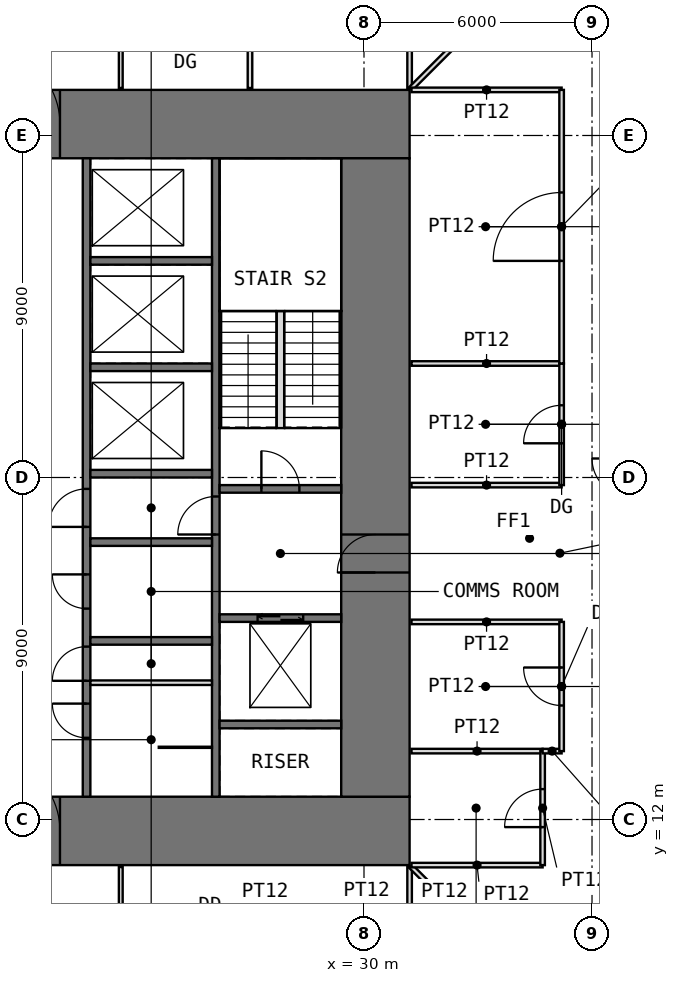
"""IFC4 building model, lengths in metres.
Left out: names, types, materials, properties, quantities, classifications, styles, units other than length and angle.
Written with IfcOpenShell. Run it as: python <this file> out.ifc"""

import sys

from ifc_helpers import new_model, si_unit, direction, frame, frame_2d, origin, place, context, subcontext, project, spatial, rectangle, extrude, element, fill, save


model = new_model("IFC4")
c1 = context("Model", 3, precision=1e-05, world=origin(), true_north=direction((0.0, 1.0)))
c2 = subcontext(c1, "Body", "Model", "MODEL_VIEW")
j1 = project(units=[si_unit("LENGTHUNIT", "METRE"), si_unit("PLANEANGLEUNIT", "RADIAN")], contexts=[c1])
p1 = place(None, origin())
s1 = spatial("IfcSite", under=j1, at=p1, CompositionType="ELEMENT")
p2 = place(p1, origin())
s2 = spatial("IfcBuilding", under=s1, at=p2, CompositionType="ELEMENT")
p3 = place(p2, frame((0.0, 0.0, 22.5)))
s3 = spatial("IfcBuildingStorey", under=s2, at=p3, CompositionType="ELEMENT", Elevation=22.5)
p4 = place(p3, frame((10.8, 11.7, -0.05), z_axis=(0.0, 0.0, 1.0), x_axis=(1.0, 0.0, 0.0)))
e1 = element("IfcWall", 1, at=p4, inside=s3, PredefinedType="SHEAR", context=c2, shape_type="SweptSolid", body=[
    extrude(rectangle(XDim=20.4, YDim=1.8, at=frame_2d((10.2, 0.0))), origin(), (0.0, 0.0, 1.0), 4.0),
])
p5 = place(p4, frame((9.2, 0.0, 0.05)))
e2 = element("IfcOpeningElement", 2, at=p5, cuts=e1, PredefinedType="OPENING", context=c2, shape_type="SweptSolid", body=[
    extrude(rectangle(XDim=2.0, YDim=2.2, at=frame_2d((1.0, 1.1))), frame((0.0, 0.91, 0.0), z_axis=(0.0, -1.0, 0.0), x_axis=(1.0, 0.0, 0.0)), (0.0, 0.0, 1.0), 1.82),
])
p6 = place(p3, frame((10.8, 30.3, -0.05), z_axis=(0.0, 0.0, 1.0), x_axis=(1.0, 0.0, 0.0)))
e3 = element("IfcWall", 3, at=p6, inside=s3, PredefinedType="SHEAR", context=c2, shape_type="SweptSolid", body=[
    extrude(rectangle(XDim=20.4, YDim=1.8, at=frame_2d((10.2, 0.0))), origin(), (0.0, 0.0, 1.0), 4.0),
])
p7 = place(p6, frame((9.2, 0.0, 0.05)))
e4 = element("IfcOpeningElement", 4, at=p7, cuts=e3, PredefinedType="OPENING", context=c2, shape_type="SweptSolid", body=[
    extrude(rectangle(XDim=2.0, YDim=2.2, at=frame_2d((1.0, 1.1))), frame((0.0, 0.91, 0.0), z_axis=(0.0, -1.0, 0.0), x_axis=(1.0, 0.0, 0.0)), (0.0, 0.0, 1.0), 1.82),
])
p8 = place(p3, frame((30.3, 12.6, -0.05), z_axis=(0.0, 0.0, 1.0), x_axis=(0.0, 1.0, 0.0)))
e5 = element("IfcWall", 5, at=p8, inside=s3, PredefinedType="SHEAR", context=c2, shape_type="SweptSolid", body=[
    extrude(rectangle(XDim=16.8, YDim=1.8, at=frame_2d((8.4, 0.0))), origin(), (0.0, 0.0, 1.0), 4.0),
])
p9 = place(p8, frame((5.9, 0.0, 0.05)))
e6 = element("IfcOpeningElement", 6, at=p9, cuts=e5, PredefinedType="OPENING", context=c2, shape_type="SweptSolid", body=[
    extrude(rectangle(XDim=1.0, YDim=2.2, at=frame_2d((0.5, 1.1))), frame((0.0, 0.91, 0.0), z_axis=(0.0, -1.0, 0.0), x_axis=(1.0, 0.0, 0.0)), (0.0, 0.0, 1.0), 1.82),
])
p10 = place(p3, frame((22.7, 12.6, -0.05), z_axis=(0.0, 0.0, 1.0), x_axis=(0.0, 1.0, 0.0)))
e7 = element("IfcWall", 7, at=p10, inside=s3, PredefinedType="SHEAR", context=c2, shape_type="SweptSolid", body=[
    extrude(rectangle(XDim=16.8, YDim=0.2, at=frame_2d((8.4, 0.0))), origin(), (0.0, 0.0, 1.0), 4.0),
])
p11 = place(p10, frame((3.05, 0.0, 0.05)))
e8 = element("IfcOpeningElement", 8, at=p11, cuts=e7, PredefinedType="OPENING", context=c2, shape_type="SweptSolid", body=[
    extrude(rectangle(XDim=0.9, YDim=2.2, at=frame_2d((0.45, 1.1))), frame((0.0, 0.11, 0.0), z_axis=(0.0, -1.0, 0.0), x_axis=(1.0, 0.0, 0.0)), (0.0, 0.0, 1.0), 0.22),
])
p12 = place(p10, frame((7.1, 0.0, 0.05)))
e9 = element("IfcOpeningElement", 9, at=p12, cuts=e7, PredefinedType="OPENING", context=c2, shape_type="SweptSolid", body=[
    extrude(rectangle(XDim=1.0, YDim=2.2, at=frame_2d((0.5, 1.1))), frame((0.0, 0.11, 0.0), z_axis=(0.0, -1.0, 0.0), x_axis=(1.0, 0.0, 0.0)), (0.0, 0.0, 1.0), 0.22),
])
p13 = place(p10, frame((1.55, 0.0, 0.05)))
e10 = element("IfcOpeningElement", 10, at=p13, cuts=e7, PredefinedType="OPENING", context=c2, shape_type="SweptSolid", body=[
    extrude(rectangle(XDim=0.9, YDim=2.2, at=frame_2d((0.45, 1.1))), frame((0.0, 0.11, 0.0), z_axis=(0.0, -1.0, 0.0), x_axis=(1.0, 0.0, 0.0)), (0.0, 0.0, 1.0), 0.22),
])
p14 = place(p10, frame((4.95, 0.0, 0.05)))
e11 = element("IfcOpeningElement", 11, at=p14, cuts=e7, PredefinedType="OPENING", context=c2, shape_type="SweptSolid", body=[
    extrude(rectangle(XDim=0.9, YDim=2.2, at=frame_2d((0.45, 1.1))), frame((0.0, 0.11, 0.0), z_axis=(0.0, -1.0, 0.0), x_axis=(1.0, 0.0, 0.0)), (0.0, 0.0, 1.0), 0.22),
])
p15 = place(p3, frame((26.1, 12.6, -0.05), z_axis=(0.0, 0.0, 1.0), x_axis=(0.0, 1.0, 0.0)))
e12 = element("IfcWall", 12, at=p15, inside=s3, PredefinedType="SHEAR", context=c2, shape_type="SweptSolid", body=[
    extrude(rectangle(XDim=16.8, YDim=0.2, at=frame_2d((8.4, 0.0))), origin(), (0.0, 0.0, 1.0), 4.0),
])
p16 = place(p15, frame((6.9, 0.0, 0.05)))
e13 = element("IfcOpeningElement", 13, at=p16, cuts=e12, PredefinedType="OPENING", context=c2, shape_type="SweptSolid", body=[
    extrude(rectangle(XDim=1.0, YDim=2.2, at=frame_2d((0.5, 1.1))), frame((0.0, 0.11, 0.0), z_axis=(0.0, -1.0, 0.0), x_axis=(1.0, 0.0, 0.0)), (0.0, 0.0, 1.0), 0.22),
])
for number, where, z_axis, x_axis in (
    (14, (22.8, 16.7, -0.05), (0.0, 0.0, 1.0), (1.0, 0.0, 0.0)),
    (15, (22.8, 19.3, -0.05), (0.0, 0.0, 1.0), (1.0, 0.0, 0.0)),
    (16, (22.8, 21.1, -0.05), (0.0, 0.0, 1.0), (1.0, 0.0, 0.0)),
    (17, (22.8, 23.9, -0.05), (0.0, 0.0, 1.0), (1.0, 0.0, 0.0)),
    (18, (22.8, 26.7, -0.05), (0.0, 0.0, 1.0), (1.0, 0.0, 0.0)),
    (19, (26.2, 14.5, -0.05), (0.0, 0.0, 1.0), (1.0, 0.0, 0.0)),
):
    element("IfcWall", number, at=place(p3, frame(where, z_axis=z_axis, x_axis=x_axis)), inside=s3, PredefinedType="SHEAR", context=c2, shape_type="SweptSolid", body=[
        extrude(rectangle(XDim=3.2, YDim=0.2, at=frame_2d((1.6, 0.0))), origin(), (0.0, 0.0, 1.0), 4.0),
    ])
p17 = place(p3, frame((26.2, 17.3, -0.05), z_axis=(0.0, 0.0, 1.0), x_axis=(1.0, 0.0, 0.0)))
e20 = element("IfcWall", 20, at=p17, inside=s3, PredefinedType="SHEAR", context=c2, shape_type="SweptSolid", body=[
    extrude(rectangle(XDim=3.2, YDim=0.2, at=frame_2d((1.6, 0.0))), origin(), (0.0, 0.0, 1.0), 4.0),
])
p18 = place(p17, frame((1.0, 0.0, 0.05)))
e21 = element("IfcOpeningElement", 21, at=p18, cuts=e20, PredefinedType="OPENING", context=c2, shape_type="SweptSolid", body=[
    extrude(rectangle(XDim=1.2, YDim=2.2, at=frame_2d((0.6, 1.1))), frame((0.0, 0.11, 0.0), z_axis=(0.0, -1.0, 0.0), x_axis=(1.0, 0.0, 0.0)), (0.0, 0.0, 1.0), 0.22),
])
p19 = place(p3, frame((26.2, 20.7, -0.05), z_axis=(0.0, 0.0, 1.0), x_axis=(1.0, 0.0, 0.0)))
e22 = element("IfcWall", 22, at=p19, inside=s3, PredefinedType="SHEAR", context=c2, shape_type="SweptSolid", body=[
    extrude(rectangle(XDim=3.2, YDim=0.2, at=frame_2d((1.6, 0.0))), origin(), (0.0, 0.0, 1.0), 4.0),
])
p20 = place(p19, frame((1.1, 0.0, 0.05)))
e23 = element("IfcOpeningElement", 23, at=p20, cuts=e22, PredefinedType="OPENING", context=c2, shape_type="SweptSolid", body=[
    extrude(rectangle(XDim=1.0, YDim=2.2, at=frame_2d((0.5, 1.1))), frame((0.0, 0.11, 0.0), z_axis=(0.0, -1.0, 0.0), x_axis=(1.0, 0.0, 0.0)), (0.0, 0.0, 1.0), 0.22),
])
p21 = place(p3, frame((22.8, 15.6, 0.0), z_axis=(0.0, 0.0, 1.0), x_axis=(1.0, 0.0, 0.0)))
e24 = element("IfcWall", 24, at=p21, inside=s3, PredefinedType="PARTITIONING", context=c2, shape_type="SweptSolid", body=[
    extrude(rectangle(XDim=3.2, YDim=0.12, at=frame_2d((1.6, 0.0))), origin(), (0.0, 0.0, 1.0), 3.75),
])
p22 = place(p3, frame((24.6, 13.9, 0.0), z_axis=(0.0, 0.0, 1.0), x_axis=(1.0, 0.0, 0.0)))
e25 = element("IfcWall", 25, at=p22, inside=s3, PredefinedType="PARTITIONING", context=c2, shape_type="SweptSolid", body=[
    extrude(rectangle(XDim=1.4, YDim=0.03, at=frame_2d((0.7, 0.0))), origin(), (0.0, 0.0, 1.0), 3.75),
])
for number, where, z_axis, x_axis in (
    (26, (23.6, 7.2, 0.0), (0.0, 0.0, 1.0), (0.0, 1.0, 0.0)),
    (27, (23.6, 31.25, 0.0), (0.0, 0.0, 1.0), (0.0, 1.0, 0.0)),
):
    element("IfcWall", number, at=place(p3, frame(where, z_axis=z_axis, x_axis=x_axis)), inside=s3, PredefinedType="PARTITIONING", context=c2, shape_type="SweptSolid", body=[
        extrude(rectangle(XDim=3.55, YDim=0.1, at=frame_2d((1.775, 0.0))), origin(), (0.0, 0.0, 1.0), 3.75),
    ])
for number, where, z_axis, x_axis in (
    (28, (27.0, 31.25, 0.0), (0.0, 0.0, 1.0), (0.0, 1.0, 0.0)),
    (29, (31.2, 7.2, 0.0), (0.0, 0.0, 1.0), (0.0, 1.0, 0.0)),
    (30, (31.2, 31.25, 0.0), (0.0, 0.0, 1.0), (0.0, 1.0, 0.0)),
):
    element("IfcWall", number, at=place(p3, frame(where, z_axis=z_axis, x_axis=x_axis)), inside=s3, PredefinedType="PARTITIONING", context=c2, shape_type="SweptSolid", body=[
        extrude(rectangle(XDim=3.55, YDim=0.12, at=frame_2d((1.775, 0.0))), origin(), (0.0, 0.0, 1.0), 3.75),
    ])
p23 = place(p3, frame((31.235, 10.765, 0.0), z_axis=(0.0, 0.0, 1.0), x_axis=(0.707106781187, -0.707106781187, 0.0)))
e31 = element("IfcWall", 31, at=p23, inside=s3, PredefinedType="PARTITIONING", context=c2, shape_type="SweptSolid", body=[
    extrude(rectangle(XDim=3.346, YDim=0.12, at=frame_2d((1.673, 0.0))), origin(), (0.0, 0.0, 1.0), 3.75),
])
p24 = place(p3, frame((31.235, 31.235, 0.0), z_axis=(0.0, 0.0, 1.0), x_axis=(0.707106781187, 0.707106781187, 0.0)))
e32 = element("IfcWall", 32, at=p24, inside=s3, PredefinedType="PARTITIONING", context=c2, shape_type="SweptSolid", body=[
    extrude(rectangle(XDim=5.168, YDim=0.12, at=frame_2d((2.584, 0.0))), origin(), (0.0, 0.0, 1.0), 3.75),
])
for number, where, z_axis, x_axis in (
    (33, (31.25, 10.8, 0.0), (0.0, 0.0, 1.0), (1.0, 0.0, 0.0)),
    (34, (31.25, 13.8, 0.0), (0.0, 0.0, 1.0), (1.0, 0.0, 0.0)),
):
    element("IfcWall", number, at=place(p3, frame(where, z_axis=z_axis, x_axis=x_axis)), inside=s3, PredefinedType="PARTITIONING", context=c2, shape_type="SweptSolid", body=[
        extrude(rectangle(XDim=3.45, YDim=0.12, at=frame_2d((1.725, 0.0))), origin(), (0.0, 0.0, 1.0), 3.75),
    ])
for number, where, z_axis, x_axis in (
    (35, (31.25, 17.2, 0.0), (0.0, 0.0, 1.0), (1.0, 0.0, 0.0)),
    (36, (31.25, 20.8, 0.0), (0.0, 0.0, 1.0), (1.0, 0.0, 0.0)),
    (37, (31.25, 24.0, 0.0), (0.0, 0.0, 1.0), (1.0, 0.0, 0.0)),
    (38, (31.25, 31.2, 0.0), (0.0, 0.0, 1.0), (1.0, 0.0, 0.0)),
):
    element("IfcWall", number, at=place(p3, frame(where, z_axis=z_axis, x_axis=x_axis)), inside=s3, PredefinedType="PARTITIONING", context=c2, shape_type="SweptSolid", body=[
        extrude(rectangle(XDim=3.95, YDim=0.12, at=frame_2d((1.975, 0.0))), origin(), (0.0, 0.0, 1.0), 3.75),
    ])
p25 = place(p3, frame((34.7, 10.8, 0.0), z_axis=(0.0, 0.0, 1.0), x_axis=(0.0, 1.0, 0.0)))
e39 = element("IfcWall", 39, at=p25, inside=s3, PredefinedType="PARTITIONING", context=c2, shape_type="SweptSolid", body=[
    extrude(rectangle(XDim=3.0, YDim=0.12, at=frame_2d((1.5, 0.0))), origin(), (0.0, 0.0, 1.0), 3.75),
])
p26 = place(p25, frame((1.0, 0.0, 0.0)))
e40 = element("IfcOpeningElement", 40, at=p26, cuts=e39, PredefinedType="OPENING", context=c2, shape_type="SweptSolid", body=[
    extrude(rectangle(XDim=1.0, YDim=2.2, at=frame_2d((0.5, 1.1))), frame((0.0, 0.07, 0.0), z_axis=(0.0, -1.0, 0.0), x_axis=(1.0, 0.0, 0.0)), (0.0, 0.0, 1.0), 0.14),
])
p27 = place(p3, frame((34.7, 13.8, 0.0), z_axis=(0.0, 0.0, 1.0), x_axis=(1.0, 0.0, 0.0)))
e41 = element("IfcWall", 41, at=p27, inside=s3, PredefinedType="PARTITIONING", context=c2, shape_type="SweptSolid", body=[
    extrude(rectangle(XDim=0.5, YDim=0.12, at=frame_2d((0.25, 0.0))), origin(), (0.0, 0.0, 1.0), 3.75),
])
p28 = place(p3, frame((35.2, 13.8, 0.0), z_axis=(0.0, 0.0, 1.0), x_axis=(0.0, 1.0, 0.0)))
e42 = element("IfcWall", 42, at=p28, inside=s3, PredefinedType="PARTITIONING", context=c2, shape_type="SweptSolid", body=[
    extrude(rectangle(XDim=3.4, YDim=0.12, at=frame_2d((1.7, 0.0))), origin(), (0.0, 0.0, 1.0), 3.75),
])
p29 = place(p28, frame((1.2, 0.0, 0.0)))
e43 = element("IfcOpeningElement", 43, at=p29, cuts=e42, PredefinedType="OPENING", context=c2, shape_type="SweptSolid", body=[
    extrude(rectangle(XDim=1.0, YDim=2.4, at=frame_2d((0.5, 1.2))), frame((0.0, 0.07, 0.0), z_axis=(0.0, -1.0, 0.0), x_axis=(1.0, 0.0, 0.0)), (0.0, 0.0, 1.0), 0.14),
])
p30 = place(p3, frame((35.2, 20.8, 0.0), z_axis=(0.0, 0.0, 1.0), x_axis=(0.0, 1.0, 0.0)))
e44 = element("IfcWall", 44, at=p30, inside=s3, PredefinedType="PARTITIONING", context=c2, shape_type="SweptSolid", body=[
    extrude(rectangle(XDim=3.2, YDim=0.12, at=frame_2d((1.6, 0.0))), origin(), (0.0, 0.0, 1.0), 3.75),
])
p31 = place(p30, frame((1.1, 0.0, 0.0)))
e45 = element("IfcOpeningElement", 45, at=p31, cuts=e44, PredefinedType="OPENING", context=c2, shape_type="SweptSolid", body=[
    extrude(rectangle(XDim=1.0, YDim=2.4, at=frame_2d((0.5, 1.2))), frame((0.0, 0.07, 0.0), z_axis=(0.0, -1.0, 0.0), x_axis=(1.0, 0.0, 0.0)), (0.0, 0.0, 1.0), 0.14),
])
p32 = place(p3, frame((35.2, 24.0, 0.0), z_axis=(0.0, 0.0, 1.0), x_axis=(0.0, 1.0, 0.0)))
e46 = element("IfcWall", 46, at=p32, inside=s3, PredefinedType="PARTITIONING", context=c2, shape_type="SweptSolid", body=[
    extrude(rectangle(XDim=7.2, YDim=0.12, at=frame_2d((3.6, 0.0))), origin(), (0.0, 0.0, 1.0), 3.75),
])
p33 = place(p32, frame((2.7, 0.0, 0.0)))
e47 = element("IfcOpeningElement", 47, at=p33, cuts=e46, PredefinedType="OPENING", context=c2, shape_type="SweptSolid", body=[
    extrude(rectangle(XDim=1.8, YDim=2.4, at=frame_2d((0.9, 1.2))), frame((0.0, 0.07, 0.0), z_axis=(0.0, -1.0, 0.0), x_axis=(1.0, 0.0, 0.0)), (0.0, 0.0, 1.0), 0.14),
])
p34 = place(p3, frame((27.8, 22.3, 0.0), z_axis=(0.0, 0.0, 1.0), x_axis=(0.0, 1.0, 0.0)))
e48 = element("IfcWall", 48, at=p34, inside=s3, PredefinedType="PARTITIONING", context=c2, shape_type="SweptSolid", body=[
    extrude(rectangle(XDim=3.08, YDim=0.2, at=frame_2d((1.54, 0.0))), origin(), (0.0, 0.0, 1.0), 4.0),
])
p35 = place(p5, origin())
e49 = element("IfcDoor", 49, at=p35, inside=s3, OperationType="DOUBLE_DOOR_SINGLE_SWING", PredefinedType="DOOR", context=c2, shape_type="SweptSolid", body=[
    extrude(rectangle(XDim=2.0, YDim=2.2, at=frame_2d((1.0, 1.1))), frame((0.0, 0.025, 0.0), z_axis=(0.0, -1.0, 0.0), x_axis=(1.0, 0.0, 0.0)), (0.0, 0.0, 1.0), 0.05),
])
fill(e2, e49)
p36 = place(p7, origin())
e50 = element("IfcDoor", 50, at=p36, inside=s3, OperationType="DOUBLE_DOOR_SINGLE_SWING", PredefinedType="DOOR", context=c2, shape_type="SweptSolid", body=[
    extrude(rectangle(XDim=2.0, YDim=2.2, at=frame_2d((1.0, 1.1))), frame((0.0, 0.025, 0.0), z_axis=(0.0, -1.0, 0.0), x_axis=(1.0, 0.0, 0.0)), (0.0, 0.0, 1.0), 0.05),
])
fill(e4, e50)
p37 = place(p11, origin())
e51 = element("IfcDoor", 51, at=p37, inside=s3, OperationType="SINGLE_SWING_LEFT", PredefinedType="DOOR", context=c2, shape_type="SweptSolid", body=[
    extrude(rectangle(XDim=0.9, YDim=2.2, at=frame_2d((0.45, 1.1))), frame((0.0, 0.025, 0.0), z_axis=(0.0, -1.0, 0.0), x_axis=(1.0, 0.0, 0.0)), (0.0, 0.0, 1.0), 0.05),
])
fill(e8, e51)
p38 = place(p9, origin())
e52 = element("IfcDoor", 52, at=p38, inside=s3, OperationType="SINGLE_SWING_LEFT", PredefinedType="DOOR", context=c2, shape_type="SweptSolid", body=[
    extrude(rectangle(XDim=1.0, YDim=2.2, at=frame_2d((0.5, 1.1))), frame((0.0, 0.025, 0.0), z_axis=(0.0, -1.0, 0.0), x_axis=(1.0, 0.0, 0.0)), (0.0, 0.0, 1.0), 0.05),
])
fill(e6, e52)
p39 = place(p20, origin())
e53 = element("IfcDoor", 53, at=p39, inside=s3, OperationType="SINGLE_SWING_LEFT", PredefinedType="DOOR", context=c2, shape_type="SweptSolid", body=[
    extrude(rectangle(XDim=1.0, YDim=2.2, at=frame_2d((0.5, 1.1))), frame((0.0, 0.025, 0.0), z_axis=(0.0, -1.0, 0.0), x_axis=(1.0, 0.0, 0.0)), (0.0, 0.0, 1.0), 0.05),
])
fill(e23, e53)
p40 = place(p16, origin())
e54 = element("IfcDoor", 54, at=p40, inside=s3, OperationType="SINGLE_SWING_LEFT", PredefinedType="DOOR", context=c2, shape_type="SweptSolid", body=[
    extrude(rectangle(XDim=1.0, YDim=2.2, at=frame_2d((0.5, 1.1))), frame((0.0, 0.025, 0.0), z_axis=(0.0, -1.0, 0.0), x_axis=(1.0, 0.0, 0.0)), (0.0, 0.0, 1.0), 0.05),
])
fill(e13, e54)
p41 = place(p12, origin())
e55 = element("IfcDoor", 55, at=p41, inside=s3, OperationType="SINGLE_SWING_LEFT", PredefinedType="DOOR", context=c2, shape_type="SweptSolid", body=[
    extrude(rectangle(XDim=1.0, YDim=2.2, at=frame_2d((0.5, 1.1))), frame((0.0, 0.025, 0.0), z_axis=(0.0, -1.0, 0.0), x_axis=(1.0, 0.0, 0.0)), (0.0, 0.0, 1.0), 0.05),
])
fill(e9, e55)
p42 = place(p13, origin())
e56 = element("IfcDoor", 56, at=p42, inside=s3, OperationType="SINGLE_SWING_RIGHT", PredefinedType="DOOR", context=c2, shape_type="SweptSolid", body=[
    extrude(rectangle(XDim=0.9, YDim=2.2, at=frame_2d((0.45, 1.1))), frame((0.0, 0.025, 0.0), z_axis=(0.0, -1.0, 0.0), x_axis=(1.0, 0.0, 0.0)), (0.0, 0.0, 1.0), 0.05),
])
fill(e10, e56)
p43 = place(p14, origin())
e57 = element("IfcDoor", 57, at=p43, inside=s3, OperationType="SINGLE_SWING_RIGHT", PredefinedType="DOOR", context=c2, shape_type="SweptSolid", body=[
    extrude(rectangle(XDim=0.9, YDim=2.2, at=frame_2d((0.45, 1.1))), frame((0.0, 0.025, 0.0), z_axis=(0.0, -1.0, 0.0), x_axis=(1.0, 0.0, 0.0)), (0.0, 0.0, 1.0), 0.05),
])
fill(e11, e57)
p44 = place(p26, origin())
e58 = element("IfcDoor", 58, at=p44, inside=s3, OperationType="SINGLE_SWING_LEFT", PredefinedType="DOOR", context=c2, shape_type="SweptSolid", body=[
    extrude(rectangle(XDim=1.0, YDim=2.2, at=frame_2d((0.5, 1.1))), frame((0.0, 0.025, 0.0), z_axis=(0.0, -1.0, 0.0), x_axis=(1.0, 0.0, 0.0)), (0.0, 0.0, 1.0), 0.05),
])
fill(e40, e58)
p45 = place(p29, origin())
e59 = element("IfcDoor", 59, at=p45, inside=s3, OperationType="SINGLE_SWING_RIGHT", PredefinedType="DOOR", context=c2, shape_type="SweptSolid", body=[
    extrude(rectangle(XDim=1.0, YDim=2.4, at=frame_2d((0.5, 1.2))), frame((0.0, 0.025, 0.0), z_axis=(0.0, -1.0, 0.0), x_axis=(1.0, 0.0, 0.0)), (0.0, 0.0, 1.0), 0.05),
])
fill(e43, e59)
p46 = place(p31, origin())
e60 = element("IfcDoor", 60, at=p46, inside=s3, OperationType="SINGLE_SWING_LEFT", PredefinedType="DOOR", context=c2, shape_type="SweptSolid", body=[
    extrude(rectangle(XDim=1.0, YDim=2.4, at=frame_2d((0.5, 1.2))), frame((0.0, 0.025, 0.0), z_axis=(0.0, -1.0, 0.0), x_axis=(1.0, 0.0, 0.0)), (0.0, 0.0, 1.0), 0.05),
])
fill(e45, e60)
p47 = place(p33, origin())
e61 = element("IfcDoor", 61, at=p47, inside=s3, OperationType="DOUBLE_DOOR_SINGLE_SWING", PredefinedType="DOOR", context=c2, shape_type="SweptSolid", body=[
    extrude(rectangle(XDim=1.8, YDim=2.4, at=frame_2d((0.9, 1.2))), frame((0.0, 0.025, 0.0), z_axis=(0.0, -1.0, 0.0), x_axis=(1.0, 0.0, 0.0)), (0.0, 0.0, 1.0), 0.05),
])
fill(e47, e61)
p48 = place(p18, origin())
e62 = element("IfcDoor", 62, at=p48, inside=s3, OperationType="DOUBLE_DOOR_SLIDING", PredefinedType="DOOR", context=c2, shape_type="SweptSolid", body=[
    extrude(rectangle(XDim=1.2, YDim=2.2, at=frame_2d((0.6, 1.1))), frame((0.0, 0.025, 0.0), z_axis=(0.0, -1.0, 0.0), x_axis=(1.0, 0.0, 0.0)), (0.0, 0.0, 1.0), 0.05),
])
fill(e21, e62)
save(model, sys.argv[1])
